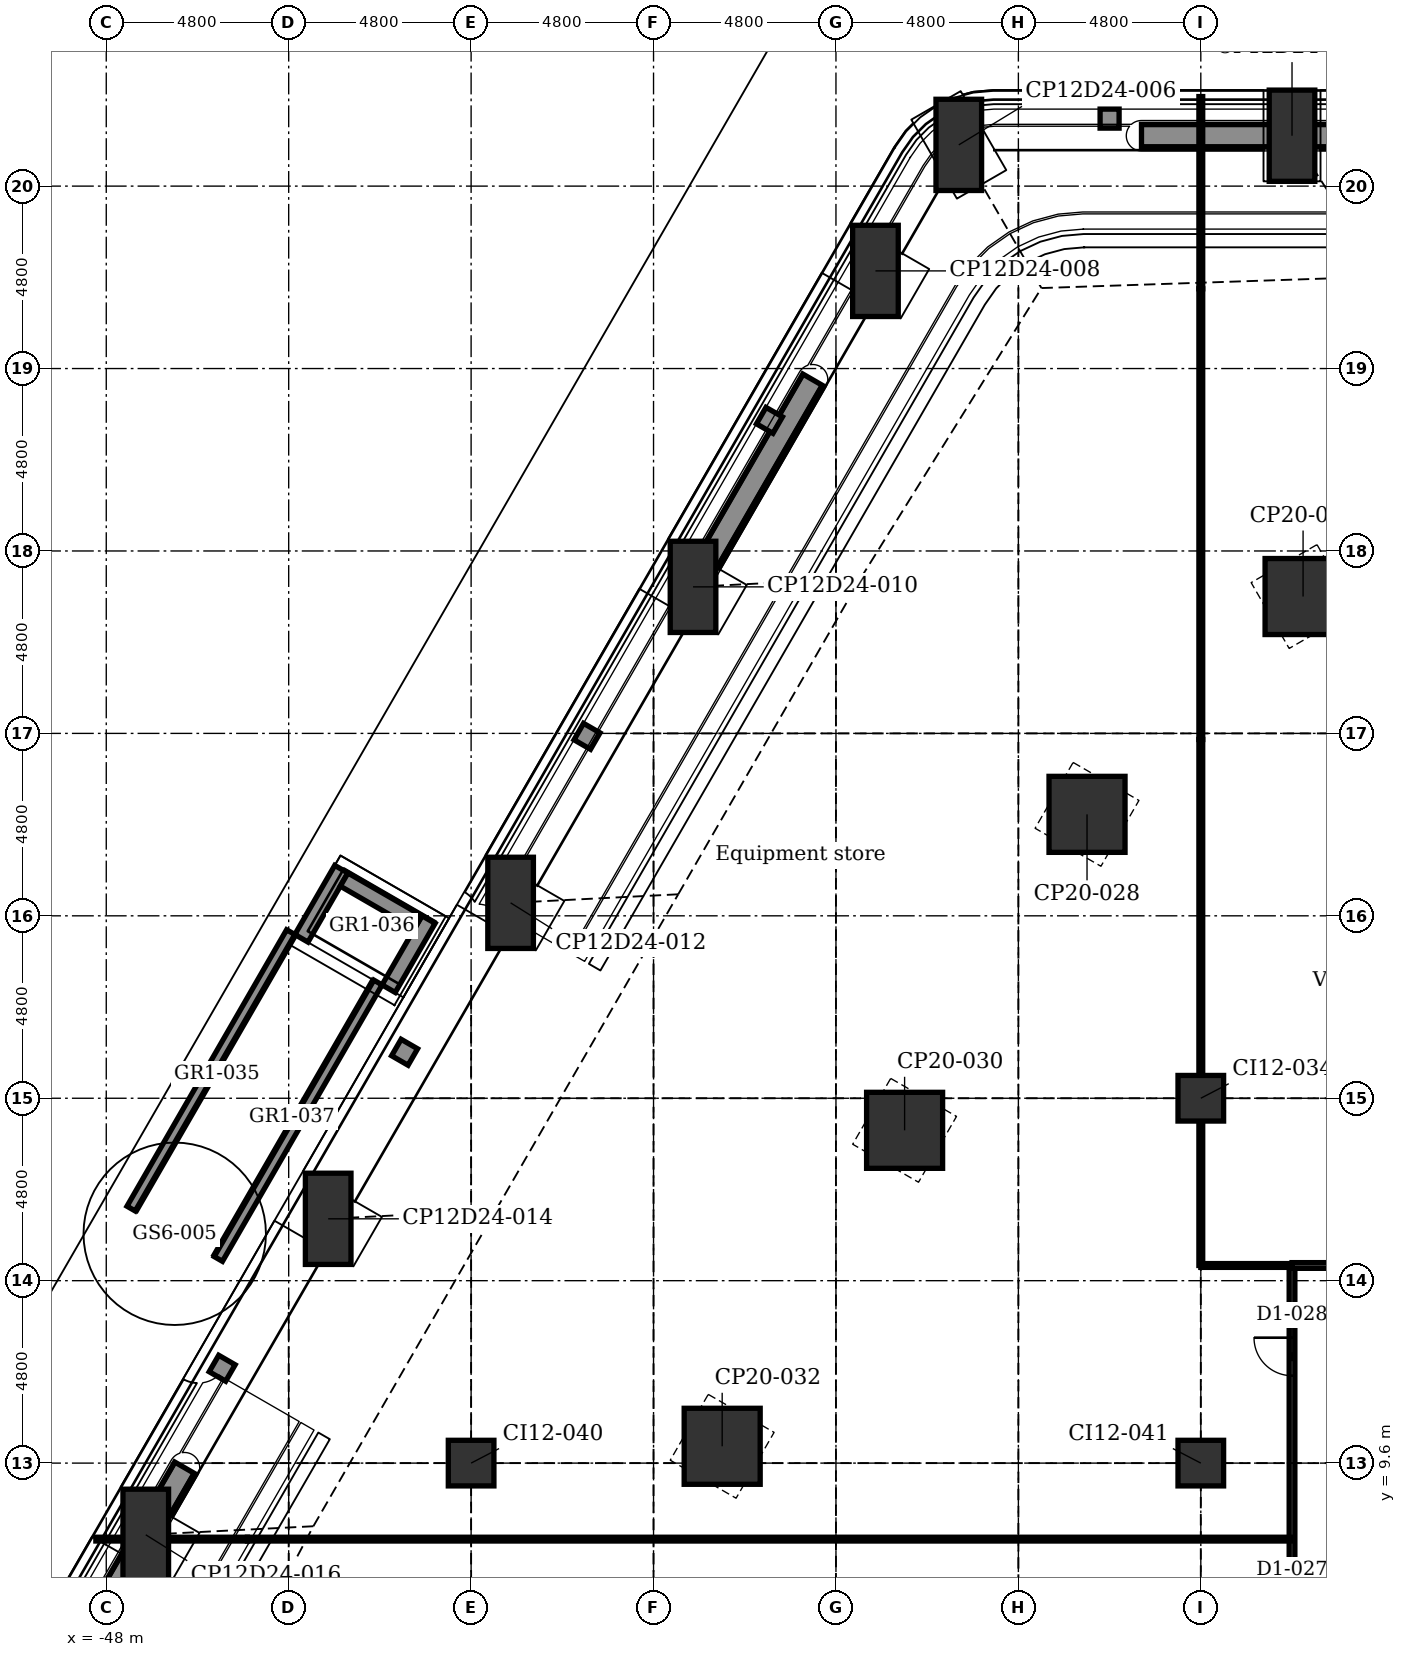
"""IFC4 building model, lengths in metres.
Left out: names, types, materials, properties, quantities, classifications, styles, units other than length and angle.
Written with IfcOpenShell. Run it as: python <this file> out.ifc"""

import sys

from ifc_helpers import new_model, si_unit, direction, frame, frame_2d, origin, origin_2d, place, context, subcontext, project, spatial, polyline, rectangle, outline, extrude, element, fill, save


model = new_model("IFC4")
c1 = context("Model", 3, precision=1e-05, world=origin(), true_north=direction((0.0, 1.0)))
c2 = subcontext(c1, "Body", "Model", "MODEL_VIEW")
j1 = project(units=[si_unit("LENGTHUNIT", "METRE"), si_unit("PLANEANGLEUNIT", "RADIAN")], contexts=[c1])
p1 = place(None, origin())
s1 = spatial("IfcSite", under=j1, at=p1, CompositionType="ELEMENT")
p2 = place(p1, origin())
s2 = spatial("IfcBuilding", under=s1, at=p2, CompositionType="ELEMENT")
p3 = place(p2, frame((0.0, 0.0, 7.0)))
s3 = spatial("IfcBuildingStorey", under=s2, at=p3, CompositionType="ELEMENT", Elevation=7.0)
for number, where, z_axis, x_axis in (
    (1, (-25.568, 44.285, -0.3), (0.0, 0.0, 1.0), (0.866, 0.5, 0.0)),
    (2, (-16.8, 44.526, -0.3), (0.0, 0.0, 1.0), (1.0, 0.0, 0.0)),
    (3, (-46.961, 7.714, -0.3), (0.0, 0.0, 1.0), (0.5, 0.866, 0.0)),
    (4, (-42.161, 16.028, -0.3), (0.0, 0.0, 1.0), (0.5, 0.866, 0.0)),
    (5, (-37.361, 24.342, -0.3), (0.0, 0.0, 1.0), (0.5, 0.866, 0.0)),
    (6, (-32.561, 32.655, -0.3), (0.0, 0.0, 1.0), (0.5, 0.866, 0.0)),
    (7, (-27.761, 40.969, -0.3), (0.0, 0.0, 1.0), (0.5, 0.866, 0.0)),
):
    element("IfcColumn", number, at=place(p3, frame(where, z_axis=z_axis, x_axis=x_axis)), inside=s3, PredefinedType="COLUMN", context=c2, shape_type="SweptSolid", body=[
        extrude(rectangle(XDim=1.2, YDim=2.4, at=origin_2d()), origin(), (0.0, 0.0, 1.0), 5.4),
    ])
for number, where, z_axis, x_axis in (
    (8, (-31.794, 10.042, -0.3), (0.0, 0.0, 1.0), (0.5, 0.866, 0.0)),
    (9, (-26.994, 18.356, -0.3), (0.0, 0.0, 1.0), (0.5, 0.866, 0.0)),
    (10, (-22.194, 26.67, -0.3), (0.0, 0.0, 1.0), (0.5, 0.866, 0.0)),
    (11, (-16.509, 32.401, -0.3), (0.0, 0.0, 1.0), (0.866, 0.5, 0.0)),
):
    element("IfcColumn", number, at=place(p3, frame(where, z_axis=z_axis, x_axis=x_axis)), inside=s3, PredefinedType="COLUMN", context=c2, shape_type="SweptSolid", body=[
        extrude(rectangle(XDim=2.0, YDim=2.0, at=origin_2d()), origin(), (0.0, 0.0, 1.0), 5.4),
    ])
for number, where, z_axis, x_axis in (
    (12, (-38.4, 9.6, -0.3), (0.0, 0.0, 1.0), (1.0, 0.0, 0.0)),
    (13, (-19.2, 9.6, -0.3), (0.0, 0.0, 1.0), (1.0, 0.0, 0.0)),
    (14, (-19.2, 19.2, -0.3), (0.0, 0.0, 1.0), (1.0, 0.0, 0.0)),
):
    element("IfcColumn", number, at=place(p3, frame(where, z_axis=z_axis, x_axis=x_axis)), inside=s3, PredefinedType="COLUMN", context=c2, shape_type="SweptSolid", body=[
        extrude(rectangle(XDim=1.2, YDim=1.2, at=origin_2d()), origin(), (0.0, 0.0, 1.0), 5.4),
    ])
for number, where, z_axis, x_axis in (
    (15, (-20.761, 44.526, 5.4), (0.0, 0.0, 1.0), (1.0, 0.0, 0.0)),
    (16, (-32.414, 32.91, 5.4), (0.0, 0.0, 1.0), (0.5, 0.866, 0.0)),
    (17, (-48.941, 4.284, 5.4), (0.0, 0.0, 1.0), (0.5, 0.866, 0.0)),
):
    element("IfcWall", number, at=place(p3, frame(where, z_axis=z_axis, x_axis=x_axis)), inside=s3, PredefinedType="USERDEFINED", context=c2, shape_type="SweptSolid", body=[
        extrude(rectangle(XDim=6.0, YDim=0.6, at=frame_2d((3.0, 0.0))), origin(), (0.0, 0.0, 1.0), 0.7),
    ])
p4 = place(p3, frame((-47.346, 16.296, 0.0), z_axis=(0.0, 0.0, 1.0), x_axis=(0.499993330357, 0.86602925447, 0.0)))
e18 = element("IfcWall", 18, at=p4, inside=s3, PredefinedType="SOLIDWALL", context=c2, shape_type="SweptSolid", body=[
    extrude(outline(polyline([(0.0, 0.0), (8.4, 0.0), (8.4, 5.5), (0.0, 0.274), (0.0, 0.0)])), frame((0.0, 0.125, 0.0), z_axis=(0.0, -1.0, 0.0), x_axis=(1.0, 0.0, 0.0)), (0.0, 0.0, 1.0), 0.25),
])
p5 = place(p3, frame((-45.051, 14.971, 0.0), z_axis=(0.0, 0.0, 1.0), x_axis=(0.500015128309, 0.866016669275, 0.0)))
e19 = element("IfcWall", 19, at=p5, inside=s3, PredefinedType="SOLIDWALL", context=c2, shape_type="SweptSolid", body=[
    extrude(outline(polyline([(0.0, 0.0), (8.4, 0.0), (8.4, 5.5), (0.0, 0.274), (0.0, 0.0)])), frame((0.0, 0.125, 0.0), z_axis=(0.0, -1.0, 0.0), x_axis=(1.0, 0.0, 0.0)), (0.0, 0.0, 1.0), 0.25),
])
for number, where, z_axis, x_axis in (
    (20, (-42.865, 23.408, 0.45), (0.0, 0.0, 1.0), (0.5, 0.866, 0.0)),
    (21, (-40.57, 22.083, 0.45), (0.0, 0.0, 1.0), (0.5, 0.866, 0.0)),
):
    element("IfcWall", number, at=place(p3, frame(where, z_axis=z_axis, x_axis=x_axis)), inside=s3, PredefinedType="SOLIDWALL", context=c2, shape_type="SweptSolid", body=[
        extrude(rectangle(XDim=2.1, YDim=0.4, at=frame_2d((1.05, 0.0))), origin(), (0.0, 0.0, 1.0), 4.75),
    ])
p6 = place(p3, frame((-39.793, 23.829, 0.45), z_axis=(0.0, 0.0, 1.0), x_axis=(-0.866017533419, 0.500013631625, 0.0)))
e22 = element("IfcWall", 22, at=p6, inside=s3, PredefinedType="SOLIDWALL", context=c2, shape_type="SweptSolid", body=[
    extrude(rectangle(XDim=2.25, YDim=0.4, at=frame_2d((1.125, 0.0))), origin(), (0.0, 0.0, 1.0), 4.75),
])
for number, where, z_axis, x_axis in (
    (23, (-21.85, 44.976, 0.0), (0.0, 0.0, 1.0), (1.0, 0.0, 0.0)),
    (24, (-45.075, 11.879, 0.0), (0.0, 0.0, 1.0), (0.5, 0.866, 0.0)),
):
    element("IfcWall", number, at=place(p3, frame(where, z_axis=z_axis, x_axis=x_axis)), inside=s3, PredefinedType="SOLIDWALL", context=c2, shape_type="SweptSolid", body=[
        extrude(rectangle(XDim=0.5, YDim=0.5, at=frame_2d((0.25, 0.0))), origin(), (0.0, 0.0, 1.0), 4.8),
    ])
for number, where, z_axis, x_axis in (
    (25, (-40.275, 20.194, 0.0), (0.0, 0.0, 1.0), (0.5, 0.866, 0.0)),
    (26, (-35.475, 28.507, 0.0), (0.0, 0.0, 1.0), (0.5, 0.866, 0.0)),
    (27, (-30.675, 36.821, 0.0), (0.0, 0.0, 1.0), (0.5, 0.866, 0.0)),
):
    element("IfcWall", number, at=place(p3, frame(where, z_axis=z_axis, x_axis=x_axis)), inside=s3, PredefinedType="SOLIDWALL", context=c2, shape_type="SweptSolid", body=[
        extrude(rectangle(XDim=0.5, YDim=0.5, at=frame_2d((0.25, 0.0))), origin(), (0.0, 0.0, 1.0), 4.8),
    ])
p7 = place(p3, frame((-16.8, 3.95, 0.0), z_axis=(0.0, 0.0, 1.0), x_axis=(0.0, 1.0, 0.0)))
e28 = element("IfcWall", 28, at=p7, inside=s3, PredefinedType="PARTITIONING", context=c2, shape_type="SweptSolid", body=[
    extrude(rectangle(XDim=10.85, YDim=0.15, at=frame_2d((5.425, 0.0))), origin(), (0.0, 0.0, 1.0), 5.1),
])
p8 = place(p7, frame((1.25, 0.0, 0.0)))
e29 = element("IfcOpeningElement", 29, at=p8, cuts=e28, PredefinedType="OPENING", context=c2, shape_type="SweptSolid", body=[
    extrude(rectangle(XDim=1.0, YDim=2.1, at=frame_2d((0.5, 1.05))), frame((0.0, 0.085, 0.0), z_axis=(0.0, -1.0, 0.0), x_axis=(1.0, 0.0, 0.0)), (0.0, 0.0, 1.0), 0.17),
])
p9 = place(p7, frame((7.95, 0.0, 0.0)))
e30 = element("IfcOpeningElement", 30, at=p9, cuts=e28, PredefinedType="OPENING", context=c2, shape_type="SweptSolid", body=[
    extrude(rectangle(XDim=1.0, YDim=2.1, at=frame_2d((0.5, 1.05))), frame((0.0, 0.085, 0.0), z_axis=(0.0, -1.0, 0.0), x_axis=(1.0, 0.0, 0.0)), (0.0, 0.0, 1.0), 0.17),
])
p10 = place(p3, frame((-19.2, 28.64, 0.0), z_axis=(0.0, 0.0, 1.0), x_axis=(0.0, 1.0, 0.0)))
e31 = element("IfcWall", 31, at=p10, inside=s3, PredefinedType="PARTITIONING", context=c2, shape_type="SweptSolid", body=[
    extrude(rectangle(XDim=11.858, YDim=0.1, at=frame_2d((5.929, 0.0))), origin(), (0.0, 0.0, 1.0), 4.567),
])
p11 = place(p3, frame((-19.2, 14.8, 0.0), z_axis=(0.0, 0.0, 1.0), x_axis=(0.0, 1.0, 0.0)))
e32 = element("IfcWall", 32, at=p11, inside=s3, PredefinedType="PARTITIONING", context=c2, shape_type="SweptSolid", body=[
    extrude(rectangle(XDim=3.84, YDim=0.1, at=frame_2d((1.92, 0.0))), origin(), (0.0, 0.0, 1.0), 4.693),
])
p12 = place(p3, frame((-19.2, 18.64, 0.0), z_axis=(0.0, 0.0, 1.0), x_axis=(0.0, 1.0, 0.0)))
e33 = element("IfcWall", 33, at=p12, inside=s3, PredefinedType="PARTITIONING", context=c2, shape_type="SweptSolid", body=[
    extrude(rectangle(XDim=1.12, YDim=0.1, at=frame_2d((0.56, 0.0))), origin(), (0.0, 0.0, 1.0), 5.1),
])
p13 = place(p3, frame((-19.2, 19.76, 0.0), z_axis=(0.0, 0.0, 1.0), x_axis=(0.0, 1.0, 0.0)))
e34 = element("IfcWall", 34, at=p13, inside=s3, PredefinedType="PARTITIONING", context=c2, shape_type="SweptSolid", body=[
    extrude(rectangle(XDim=8.88, YDim=0.1, at=frame_2d((4.44, 0.0))), origin(), (0.0, 0.0, 1.0), 4.693),
])
p14 = place(p3, frame((-19.2, 40.498, 0.0), z_axis=(0.0, 0.0, 1.0), x_axis=(0.0, 1.0, 0.0)))
e35 = element("IfcWall", 35, at=p14, inside=s3, PredefinedType="PARTITIONING", context=c2, shape_type="SweptSolid", body=[
    extrude(rectangle(XDim=5.058, YDim=0.1, at=frame_2d((2.529, 0.0))), origin(), (0.0, 0.0, 1.0), 5.1),
])
p15 = place(p3, frame((-44.286, 7.6, 0.0), z_axis=(0.0, 0.0, 1.0), x_axis=(1.0, 0.0, 0.0)))
e36 = element("IfcWall", 36, at=p15, inside=s3, PredefinedType="PARTITIONING", context=c2, shape_type="SweptSolid", body=[
    extrude(rectangle(XDim=27.486, YDim=0.1, at=frame_2d((13.743, 0.0))), origin(), (0.0, 0.0, 1.0), 5.1),
])
p16 = place(p3, frame((-48.274, 7.6, 0.0), z_axis=(0.0, 0.0, 1.0), x_axis=(1.0, 0.0, 0.0)))
e37 = element("IfcWall", 37, at=p16, inside=s3, PredefinedType="PARTITIONING", context=c2, shape_type="SweptSolid", body=[
    extrude(rectangle(XDim=1.907, YDim=0.1, at=frame_2d((0.954, 0.0))), origin(), (0.0, 0.0, 1.0), 5.1),
])
p17 = place(p3, frame((-46.367, 7.6, 0.0), z_axis=(0.0, 0.0, 1.0), x_axis=(1.0, 0.0, 0.0)))
e38 = element("IfcWall", 38, at=p17, inside=s3, PredefinedType="PARTITIONING", context=c2, shape_type="SweptSolid", body=[
    extrude(rectangle(XDim=2.08, YDim=0.1, at=frame_2d((1.04, 0.0))), origin(), (0.0, 0.0, 1.0), 3.9),
])
p18 = place(p3, frame((-19.2, 14.8, 0.0), z_axis=(0.0, 0.0, 1.0), x_axis=(1.0, 0.0, 0.0)))
e39 = element("IfcWall", 39, at=p18, inside=s3, PredefinedType="PARTITIONING", context=c2, shape_type="SweptSolid", body=[
    extrude(rectangle(XDim=2.4, YDim=0.1, at=frame_2d((1.2, 0.0))), origin(), (0.0, 0.0, 1.0), 5.1),
])
p19 = place(p3, frame((-16.8, 14.8, 0.0), z_axis=(0.0, 0.0, 1.0), x_axis=(1.0, 0.0, 0.0)))
e40 = element("IfcWall", 40, at=p19, inside=s3, PredefinedType="PARTITIONING", context=c2, shape_type="SweptSolid", body=[
    extrude(rectangle(XDim=33.6, YDim=0.15, at=frame_2d((16.8, 0.0))), origin(), (0.0, 0.0, 1.0), 5.1),
])
p20 = place(p19, frame((15.75, 0.0, 0.0)))
e41 = element("IfcOpeningElement", 41, at=p20, cuts=e40, PredefinedType="OPENING", context=c2, shape_type="SweptSolid", body=[
    extrude(rectangle(XDim=0.9, YDim=2.1, at=frame_2d((0.45, 1.05))), frame((0.0, 0.085, 0.0), z_axis=(0.0, -1.0, 0.0), x_axis=(1.0, 0.0, 0.0)), (0.0, 0.0, 1.0), 0.17),
])
p21 = place(p19, frame((18.75, 0.0, 0.0)))
e42 = element("IfcOpeningElement", 42, at=p21, cuts=e40, PredefinedType="OPENING", context=c2, shape_type="SweptSolid", body=[
    extrude(rectangle(XDim=0.9, YDim=2.1, at=frame_2d((0.45, 1.05))), frame((0.0, 0.085, 0.0), z_axis=(0.0, -1.0, 0.0), x_axis=(1.0, 0.0, 0.0)), (0.0, 0.0, 1.0), 0.17),
])
p22 = place(p19, frame((3.375, 0.0, 0.0)))
e43 = element("IfcOpeningElement", 43, at=p22, cuts=e40, PredefinedType="OPENING", context=c2, shape_type="SweptSolid", body=[
    extrude(rectangle(XDim=1.8, YDim=2.1, at=frame_2d((0.9, 1.05))), frame((0.0, 0.085, 0.0), z_axis=(0.0, -1.0, 0.0), x_axis=(1.0, 0.0, 0.0)), (0.0, 0.0, 1.0), 0.17),
])
p23 = place(p19, frame((10.3, 0.0, 0.0)))
e44 = element("IfcOpeningElement", 44, at=p23, cuts=e40, PredefinedType="OPENING", context=c2, shape_type="SweptSolid", body=[
    extrude(rectangle(XDim=1.0, YDim=2.1, at=frame_2d((0.5, 1.05))), frame((0.0, 0.085, 0.0), z_axis=(0.0, -1.0, 0.0), x_axis=(1.0, 0.0, 0.0)), (0.0, 0.0, 1.0), 0.17),
])
p24 = place(p19, frame((23.325, 0.0, 0.0)))
e45 = element("IfcOpeningElement", 45, at=p24, cuts=e40, PredefinedType="OPENING", context=c2, shape_type="SweptSolid", body=[
    extrude(rectangle(XDim=1.8, YDim=2.1, at=frame_2d((0.9, 1.05))), frame((0.0, 0.085, 0.0), z_axis=(0.0, -1.0, 0.0), x_axis=(1.0, 0.0, 0.0)), (0.0, 0.0, 1.0), 0.17),
])
p25 = place(p19, frame((28.3, 0.0, 0.0)))
e46 = element("IfcOpeningElement", 46, at=p25, cuts=e40, PredefinedType="OPENING", context=c2, shape_type="SweptSolid", body=[
    extrude(rectangle(XDim=1.0, YDim=2.1, at=frame_2d((0.5, 1.05))), frame((0.0, 0.085, 0.0), z_axis=(0.0, -1.0, 0.0), x_axis=(1.0, 0.0, 0.0)), (0.0, 0.0, 1.0), 0.17),
])
p26 = place(p19, frame((32.075, 0.0, 0.0)))
e47 = element("IfcOpeningElement", 47, at=p26, cuts=e40, PredefinedType="OPENING", context=c2, shape_type="SweptSolid", body=[
    extrude(rectangle(XDim=1.0, YDim=2.1, at=frame_2d((0.5, 1.05))), frame((0.0, 0.085, 0.0), z_axis=(0.0, -1.0, 0.0), x_axis=(1.0, 0.0, 0.0)), (0.0, 0.0, 1.0), 0.17),
])
p27 = place(p9, origin())
e48 = element("IfcDoor", 48, at=p27, inside=s3, OperationType="SINGLE_SWING_RIGHT", PredefinedType="DOOR", context=c2, shape_type="SweptSolid", body=[
    extrude(rectangle(XDim=1.0, YDim=2.1, at=frame_2d((0.5, 1.05))), frame((0.0, 0.025, 0.0), z_axis=(0.0, -1.0, 0.0), x_axis=(1.0, 0.0, 0.0)), (0.0, 0.0, 1.0), 0.05),
])
fill(e30, e48)
save(model, sys.argv[1])
